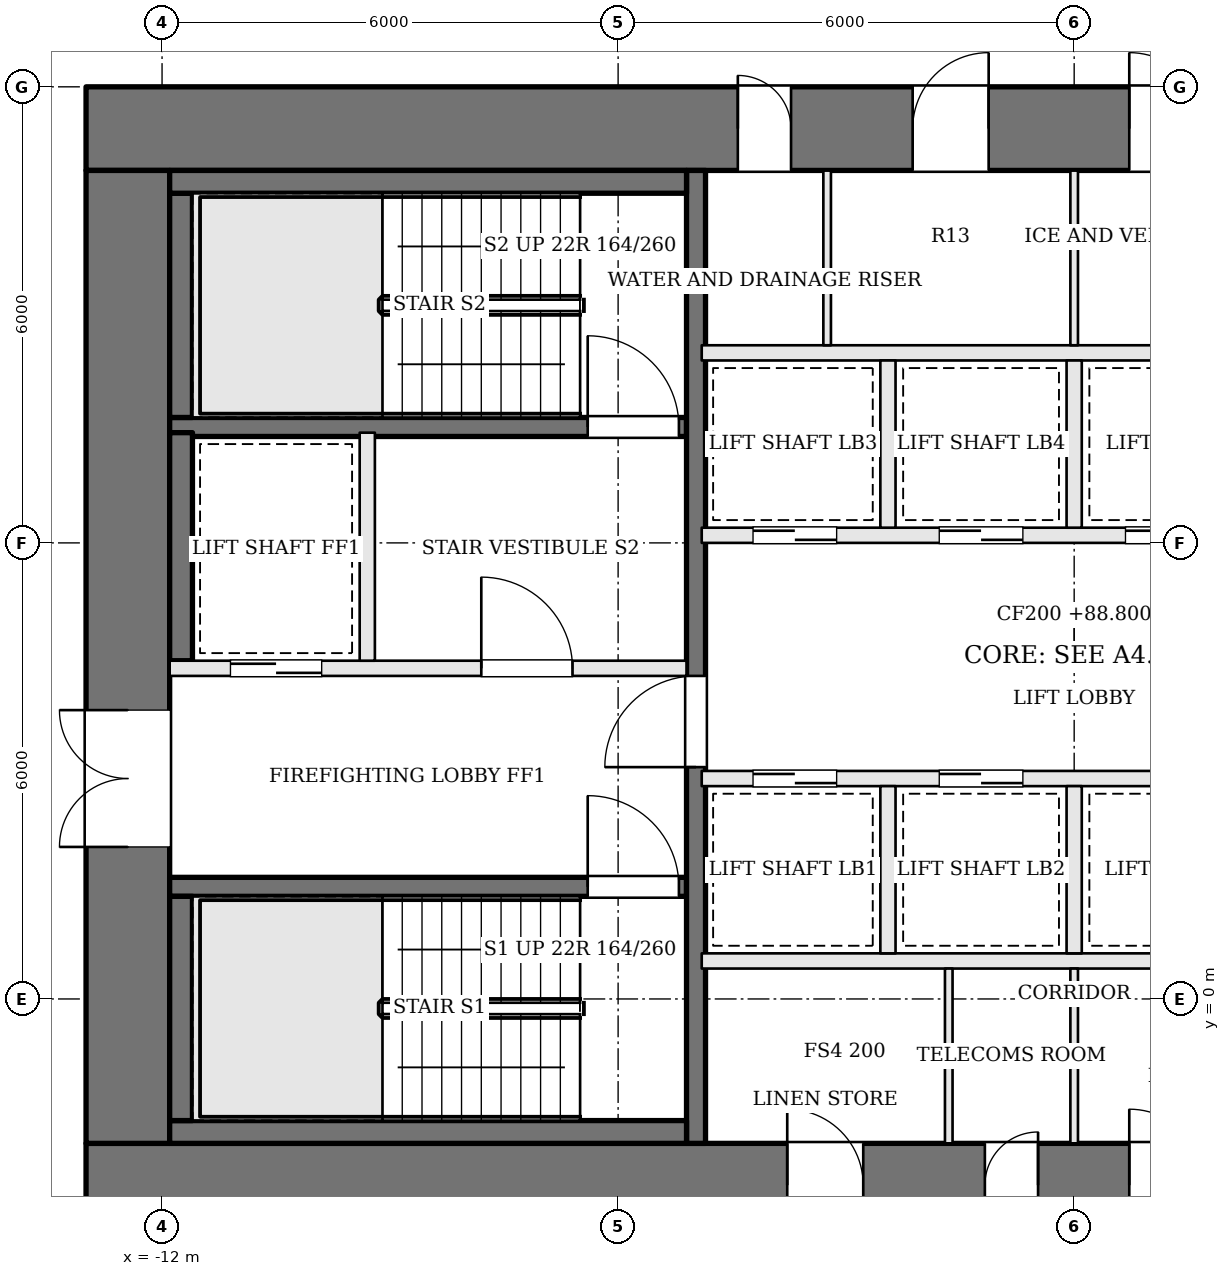
"""IFC4 building model, lengths in metres.
Left out: names, types, materials, properties, quantities, classifications, styles, units other than length and angle.
Written with IfcOpenShell. Run it as: python <this file> out.ifc"""

import sys

from ifc_helpers import new_model, si_unit, direction, frame, frame_2d, origin, place, context, subcontext, project, spatial, rectangle, extrude, element, fill, save


model = new_model("IFC4")
c1 = context("Model", 3, precision=1e-05, world=origin(), true_north=direction((0.0, 1.0)))
c2 = subcontext(c1, "Body", "Model", "MODEL_VIEW")
j1 = project(units=[si_unit("LENGTHUNIT", "METRE"), si_unit("PLANEANGLEUNIT", "RADIAN")], contexts=[c1])
p1 = place(None, origin())
s1 = spatial("IfcSite", under=j1, at=p1, CompositionType="ELEMENT")
p2 = place(p1, origin())
s2 = spatial("IfcBuilding", under=s1, at=p2, CompositionType="ELEMENT")
p3 = place(p2, frame((0.0, 0.0, 88.8)))
s3 = spatial("IfcBuildingStorey", under=s2, at=p3, CompositionType="ELEMENT", Elevation=88.8)
p4 = place(p3, frame((-13.0, 11.45, 0.0), z_axis=(0.0, 0.0, 1.0), x_axis=(1.0, 0.0, 0.0)))
e1 = element("IfcWall", 1, at=p4, inside=s3, PredefinedType="SHEAR", context=c2, shape_type="SweptSolid", body=[
    extrude(rectangle(XDim=26.0, YDim=1.1, at=frame_2d((13.0, 0.0))), origin(), (0.0, 0.0, 1.0), 3.6),
])
p5 = place(p4, frame((8.575, 0.0, 0.0)))
e2 = element("IfcOpeningElement", 2, at=p5, cuts=e1, PredefinedType="OPENING", context=c2, shape_type="SweptSolid", body=[
    extrude(rectangle(XDim=0.7, YDim=2.1, at=frame_2d((0.35, 1.05))), frame((0.0, 0.56, 0.0), z_axis=(0.0, -1.0, 0.0), x_axis=(1.0, 0.0, 0.0)), (0.0, 0.0, 1.0), 1.12),
])
p6 = place(p4, frame((10.875, 0.0, 0.0)))
e3 = element("IfcOpeningElement", 3, at=p6, cuts=e1, PredefinedType="OPENING", context=c2, shape_type="SweptSolid", body=[
    extrude(rectangle(XDim=1.0, YDim=2.1, at=frame_2d((0.5, 1.05))), frame((0.0, 0.56, 0.0), z_axis=(0.0, -1.0, 0.0), x_axis=(1.0, 0.0, 0.0)), (0.0, 0.0, 1.0), 1.12),
])
p7 = place(p4, frame((13.725, 0.0, 0.0)))
e4 = element("IfcOpeningElement", 4, at=p7, cuts=e1, PredefinedType="OPENING", context=c2, shape_type="SweptSolid", body=[
    extrude(rectangle(XDim=1.0, YDim=2.1, at=frame_2d((0.5, 1.05))), frame((0.0, 0.56, 0.0), z_axis=(0.0, -1.0, 0.0), x_axis=(1.0, 0.0, 0.0)), (0.0, 0.0, 1.0), 1.12),
])
p8 = place(p4, frame((16.175, 0.0, 0.0)))
e5 = element("IfcOpeningElement", 5, at=p8, cuts=e1, PredefinedType="OPENING", context=c2, shape_type="SweptSolid", body=[
    extrude(rectangle(XDim=1.0, YDim=2.1, at=frame_2d((0.5, 1.05))), frame((0.0, 0.56, 0.0), z_axis=(0.0, -1.0, 0.0), x_axis=(1.0, 0.0, 0.0)), (0.0, 0.0, 1.0), 1.12),
])
p9 = place(p3, frame((-13.0, -2.45, 0.0), z_axis=(0.0, 0.0, 1.0), x_axis=(1.0, 0.0, 0.0)))
e6 = element("IfcWall", 6, at=p9, inside=s3, PredefinedType="SHEAR", context=c2, shape_type="SweptSolid", body=[
    extrude(rectangle(XDim=26.0, YDim=1.1, at=frame_2d((13.0, 0.0))), origin(), (0.0, 0.0, 1.0), 3.6),
])
p10 = place(p9, frame((9.225, 0.0, 0.0)))
e7 = element("IfcOpeningElement", 7, at=p10, cuts=e6, PredefinedType="OPENING", context=c2, shape_type="SweptSolid", body=[
    extrude(rectangle(XDim=1.0, YDim=2.1, at=frame_2d((0.5, 1.05))), frame((0.0, 0.56, 0.0), z_axis=(0.0, -1.0, 0.0), x_axis=(1.0, 0.0, 0.0)), (0.0, 0.0, 1.0), 1.12),
])
p11 = place(p9, frame((11.825, 0.0, 0.0)))
e8 = element("IfcOpeningElement", 8, at=p11, cuts=e6, PredefinedType="OPENING", context=c2, shape_type="SweptSolid", body=[
    extrude(rectangle(XDim=0.7, YDim=2.1, at=frame_2d((0.35, 1.05))), frame((0.0, 0.56, 0.0), z_axis=(0.0, -1.0, 0.0), x_axis=(1.0, 0.0, 0.0)), (0.0, 0.0, 1.0), 1.12),
])
p12 = place(p9, frame((13.725, 0.0, 0.0)))
e9 = element("IfcOpeningElement", 9, at=p12, cuts=e6, PredefinedType="OPENING", context=c2, shape_type="SweptSolid", body=[
    extrude(rectangle(XDim=1.0, YDim=2.1, at=frame_2d((0.5, 1.05))), frame((0.0, 0.56, 0.0), z_axis=(0.0, -1.0, 0.0), x_axis=(1.0, 0.0, 0.0)), (0.0, 0.0, 1.0), 1.12),
])
p13 = place(p9, frame((16.225, 0.0, 0.0)))
e10 = element("IfcOpeningElement", 10, at=p13, cuts=e6, PredefinedType="OPENING", context=c2, shape_type="SweptSolid", body=[
    extrude(rectangle(XDim=0.9, YDim=2.1, at=frame_2d((0.45, 1.05))), frame((0.0, 0.56, 0.0), z_axis=(0.0, -1.0, 0.0), x_axis=(1.0, 0.0, 0.0)), (0.0, 0.0, 1.0), 1.12),
])
p14 = place(p3, frame((-12.45, -1.9, 0.0), z_axis=(0.0, 0.0, 1.0), x_axis=(0.0, 1.0, 0.0)))
e11 = element("IfcWall", 11, at=p14, inside=s3, PredefinedType="SHEAR", context=c2, shape_type="SweptSolid", body=[
    extrude(rectangle(XDim=12.8, YDim=1.1, at=frame_2d((6.4, 0.0))), origin(), (0.0, 0.0, 1.0), 3.6),
])
p15 = place(p14, frame((3.9, 0.0, 0.0)))
e12 = element("IfcOpeningElement", 12, at=p15, cuts=e11, PredefinedType="OPENING", context=c2, shape_type="SweptSolid", body=[
    extrude(rectangle(XDim=1.8, YDim=2.1, at=frame_2d((0.9, 1.05))), frame((0.0, 0.56, 0.0), z_axis=(0.0, -1.0, 0.0), x_axis=(1.0, 0.0, 0.0)), (0.0, 0.0, 1.0), 1.12),
])
p16 = place(p3, frame((-11.9, 1.475, 0.0), z_axis=(0.0, 0.0, 1.0), x_axis=(1.0, 0.0, 0.0)))
e13 = element("IfcWall", 13, at=p16, inside=s3, PredefinedType="SOLIDWALL", context=c2, shape_type="SweptSolid", body=[
    extrude(rectangle(XDim=6.8, YDim=0.25, at=frame_2d((3.4, 0.0))), origin(), (0.0, 0.0, 1.0), 3.4),
])
p17 = place(p16, frame((5.5, 0.0, 0.0)))
e14 = element("IfcOpeningElement", 14, at=p17, cuts=e13, PredefinedType="OPENING", context=c2, shape_type="SweptSolid", body=[
    extrude(rectangle(XDim=1.2, YDim=2.1, at=frame_2d((0.6, 1.05))), frame((0.0, 0.135, 0.0), z_axis=(0.0, -1.0, 0.0), x_axis=(1.0, 0.0, 0.0)), (0.0, 0.0, 1.0), 0.27),
])
p18 = place(p3, frame((-11.9, 4.35, 0.0), z_axis=(0.0, 0.0, 1.0), x_axis=(1.0, 0.0, 0.0)))
e15 = element("IfcWall", 15, at=p18, inside=s3, PredefinedType="SOLIDWALL", context=c2, shape_type="SweptSolid", body=[
    extrude(rectangle(XDim=6.8, YDim=0.2, at=frame_2d((3.4, 0.0))), origin(), (0.0, 0.0, 1.0), 3.4),
])
p19 = place(p18, frame((4.1, 0.0, 0.0)))
e16 = element("IfcOpeningElement", 16, at=p19, cuts=e15, PredefinedType="OPENING", context=c2, shape_type="SweptSolid", body=[
    extrude(rectangle(XDim=1.2, YDim=2.1, at=frame_2d((0.6, 1.05))), frame((0.0, 0.11, 0.0), z_axis=(0.0, -1.0, 0.0), x_axis=(1.0, 0.0, 0.0)), (0.0, 0.0, 1.0), 0.22),
])
p20 = place(p18, frame((0.8, 0.0, 0.0)))
e17 = element("IfcOpeningElement", 17, at=p20, cuts=e15, PredefinedType="OPENING", context=c2, shape_type="SweptSolid", body=[
    extrude(rectangle(XDim=1.2, YDim=2.1, at=frame_2d((0.6, 1.05))), frame((0.0, 0.11, 0.0), z_axis=(0.0, -1.0, 0.0), x_axis=(1.0, 0.0, 0.0)), (0.0, 0.0, 1.0), 0.22),
])
p21 = place(p3, frame((-11.9, 7.525, 0.0), z_axis=(0.0, 0.0, 1.0), x_axis=(1.0, 0.0, 0.0)))
e18 = element("IfcWall", 18, at=p21, inside=s3, PredefinedType="SOLIDWALL", context=c2, shape_type="SweptSolid", body=[
    extrude(rectangle(XDim=6.8, YDim=0.25, at=frame_2d((3.4, 0.0))), origin(), (0.0, 0.0, 1.0), 3.4),
])
p22 = place(p21, frame((5.5, 0.0, 0.0)))
e19 = element("IfcOpeningElement", 19, at=p22, cuts=e18, PredefinedType="OPENING", context=c2, shape_type="SweptSolid", body=[
    extrude(rectangle(XDim=1.2, YDim=2.1, at=frame_2d((0.6, 1.05))), frame((0.0, 0.135, 0.0), z_axis=(0.0, -1.0, 0.0), x_axis=(1.0, 0.0, 0.0)), (0.0, 0.0, 1.0), 0.27),
])
p23 = place(p3, frame((-9.3, 4.45, 0.0), z_axis=(0.0, 0.0, 1.0), x_axis=(0.0, 1.0, 0.0)))
e20 = element("IfcWall", 20, at=p23, inside=s3, PredefinedType="SOLIDWALL", context=c2, shape_type="SweptSolid", body=[
    extrude(rectangle(XDim=3.0, YDim=0.2, at=frame_2d((1.5, 0.0))), origin(), (0.0, 0.0, 1.0), 3.4),
])
p24 = place(p3, frame((-4.975, -1.9, 0.0), z_axis=(0.0, 0.0, 1.0), x_axis=(0.0, 1.0, 0.0)))
e21 = element("IfcWall", 21, at=p24, inside=s3, PredefinedType="SOLIDWALL", context=c2, shape_type="SweptSolid", body=[
    extrude(rectangle(XDim=12.8, YDim=0.25, at=frame_2d((6.4, 0.0))), origin(), (0.0, 0.0, 1.0), 3.4),
])
p25 = place(p24, frame((4.95, 0.0, 0.0)))
e22 = element("IfcOpeningElement", 22, at=p25, cuts=e21, PredefinedType="OPENING", context=c2, shape_type="SweptSolid", body=[
    extrude(rectangle(XDim=1.2, YDim=2.1, at=frame_2d((0.6, 1.05))), frame((0.0, 0.135, 0.0), z_axis=(0.0, -1.0, 0.0), x_axis=(1.0, 0.0, 0.0)), (0.0, 0.0, 1.0), 0.27),
])
p26 = place(p3, frame((-11.9, -1.75, 0.0), z_axis=(0.0, 0.0, 1.0), x_axis=(1.0, 0.0, 0.0)))
e23 = element("IfcWall", 23, at=p26, inside=s3, PredefinedType="SOLIDWALL", context=c2, shape_type="SweptSolid", body=[
    extrude(rectangle(XDim=6.8, YDim=0.3, at=frame_2d((3.4, 0.0))), origin(), (0.0, 0.0, 1.0), 3.4),
])
p27 = place(p3, frame((-11.75, -1.6, 0.0), z_axis=(0.0, 0.0, 1.0), x_axis=(0.0, 1.0, 0.0)))
e24 = element("IfcWall", 24, at=p27, inside=s3, PredefinedType="SOLIDWALL", context=c2, shape_type="SweptSolid", body=[
    extrude(rectangle(XDim=2.95, YDim=0.3, at=frame_2d((1.475, 0.0))), origin(), (0.0, 0.0, 1.0), 3.4),
])
p28 = place(p3, frame((-11.75, 4.45, 0.0), z_axis=(0.0, 0.0, 1.0), x_axis=(0.0, 1.0, 0.0)))
e25 = element("IfcWall", 25, at=p28, inside=s3, PredefinedType="SOLIDWALL", context=c2, shape_type="SweptSolid", body=[
    extrude(rectangle(XDim=3.0, YDim=0.3, at=frame_2d((1.5, 0.0))), origin(), (0.0, 0.0, 1.0), 3.4),
])
p29 = place(p3, frame((-11.75, 7.65, 0.0), z_axis=(0.0, 0.0, 1.0), x_axis=(0.0, 1.0, 0.0)))
e26 = element("IfcWall", 26, at=p29, inside=s3, PredefinedType="SOLIDWALL", context=c2, shape_type="SweptSolid", body=[
    extrude(rectangle(XDim=2.95, YDim=0.3, at=frame_2d((1.475, 0.0))), origin(), (0.0, 0.0, 1.0), 3.4),
])
p30 = place(p3, frame((-11.9, 10.75, 0.0), z_axis=(0.0, 0.0, 1.0), x_axis=(1.0, 0.0, 0.0)))
e27 = element("IfcWall", 27, at=p30, inside=s3, PredefinedType="SOLIDWALL", context=c2, shape_type="SweptSolid", body=[
    extrude(rectangle(XDim=6.8, YDim=0.3, at=frame_2d((3.4, 0.0))), origin(), (0.0, 0.0, 1.0), 3.4),
])
p31 = place(p3, frame((-4.9, 0.5, 0.0), z_axis=(0.0, 0.0, 1.0), x_axis=(1.0, 0.0, 0.0)))
e28 = element("IfcWall", 28, at=p31, inside=s3, PredefinedType="SOLIDWALL", context=c2, shape_type="SweptSolid", body=[
    extrude(rectangle(XDim=9.8, YDim=0.2, at=frame_2d((4.9, 0.0))), origin(), (0.0, 0.0, 1.0), 3.4),
])
p32 = place(p3, frame((-4.9, 2.9, 0.0), z_axis=(0.0, 0.0, 1.0), x_axis=(1.0, 0.0, 0.0)))
e29 = element("IfcWall", 29, at=p32, inside=s3, PredefinedType="SOLIDWALL", context=c2, shape_type="SweptSolid", body=[
    extrude(rectangle(XDim=9.8, YDim=0.2, at=frame_2d((4.9, 0.0))), origin(), (0.0, 0.0, 1.0), 3.4),
])
p33 = place(p32, frame((0.675, 0.0, 0.0)))
e30 = element("IfcOpeningElement", 30, at=p33, cuts=e29, PredefinedType="OPENING", context=c2, shape_type="SweptSolid", body=[
    extrude(rectangle(XDim=1.1, YDim=2.1, at=frame_2d((0.55, 1.05))), frame((0.0, 0.11, 0.0), z_axis=(0.0, -1.0, 0.0), x_axis=(1.0, 0.0, 0.0)), (0.0, 0.0, 1.0), 0.22),
])
p34 = place(p32, frame((3.125, 0.0, 0.0)))
e31 = element("IfcOpeningElement", 31, at=p34, cuts=e29, PredefinedType="OPENING", context=c2, shape_type="SweptSolid", body=[
    extrude(rectangle(XDim=1.1, YDim=2.1, at=frame_2d((0.55, 1.05))), frame((0.0, 0.11, 0.0), z_axis=(0.0, -1.0, 0.0), x_axis=(1.0, 0.0, 0.0)), (0.0, 0.0, 1.0), 0.22),
])
p35 = place(p3, frame((-4.9, 6.1, 0.0), z_axis=(0.0, 0.0, 1.0), x_axis=(1.0, 0.0, 0.0)))
e32 = element("IfcWall", 32, at=p35, inside=s3, PredefinedType="SOLIDWALL", context=c2, shape_type="SweptSolid", body=[
    extrude(rectangle(XDim=9.8, YDim=0.2, at=frame_2d((4.9, 0.0))), origin(), (0.0, 0.0, 1.0), 3.4),
])
p36 = place(p35, frame((0.675, 0.0, 0.0)))
e33 = element("IfcOpeningElement", 33, at=p36, cuts=e32, PredefinedType="OPENING", context=c2, shape_type="SweptSolid", body=[
    extrude(rectangle(XDim=1.1, YDim=2.1, at=frame_2d((0.55, 1.05))), frame((0.0, 0.11, 0.0), z_axis=(0.0, -1.0, 0.0), x_axis=(1.0, 0.0, 0.0)), (0.0, 0.0, 1.0), 0.22),
])
p37 = place(p35, frame((3.125, 0.0, 0.0)))
e34 = element("IfcOpeningElement", 34, at=p37, cuts=e32, PredefinedType="OPENING", context=c2, shape_type="SweptSolid", body=[
    extrude(rectangle(XDim=1.1, YDim=2.1, at=frame_2d((0.55, 1.05))), frame((0.0, 0.11, 0.0), z_axis=(0.0, -1.0, 0.0), x_axis=(1.0, 0.0, 0.0)), (0.0, 0.0, 1.0), 0.22),
])
p38 = place(p35, frame((5.575, 0.0, 0.0)))
e35 = element("IfcOpeningElement", 35, at=p38, cuts=e32, PredefinedType="OPENING", context=c2, shape_type="SweptSolid", body=[
    extrude(rectangle(XDim=1.1, YDim=2.1, at=frame_2d((0.55, 1.05))), frame((0.0, 0.11, 0.0), z_axis=(0.0, -1.0, 0.0), x_axis=(1.0, 0.0, 0.0)), (0.0, 0.0, 1.0), 0.22),
])
p39 = place(p35, frame((8.025, 0.0, 0.0)))
e36 = element("IfcOpeningElement", 36, at=p39, cuts=e32, PredefinedType="OPENING", context=c2, shape_type="SweptSolid", body=[
    extrude(rectangle(XDim=1.1, YDim=2.1, at=frame_2d((0.55, 1.05))), frame((0.0, 0.11, 0.0), z_axis=(0.0, -1.0, 0.0), x_axis=(1.0, 0.0, 0.0)), (0.0, 0.0, 1.0), 0.22),
])
p40 = place(p3, frame((-4.9, 8.5, 0.0), z_axis=(0.0, 0.0, 1.0), x_axis=(1.0, 0.0, 0.0)))
e37 = element("IfcWall", 37, at=p40, inside=s3, PredefinedType="SOLIDWALL", context=c2, shape_type="SweptSolid", body=[
    extrude(rectangle(XDim=9.8, YDim=0.2, at=frame_2d((4.9, 0.0))), origin(), (0.0, 0.0, 1.0), 3.4),
])
for number, where, z_axis, x_axis in (
    (38, (-2.45, 0.6, 0.0), (0.0, 0.0, 1.0), (0.0, 1.0, 0.0)),
    (39, (0.0, 0.6, 0.0), (0.0, 0.0, 1.0), (0.0, 1.0, 0.0)),
    (40, (-2.45, 6.2, 0.0), (0.0, 0.0, 1.0), (0.0, 1.0, 0.0)),
    (41, (0.0, 6.2, 0.0), (0.0, 0.0, 1.0), (0.0, 1.0, 0.0)),
):
    element("IfcWall", number, at=place(p3, frame(where, z_axis=z_axis, x_axis=x_axis)), inside=s3, PredefinedType="SOLIDWALL", context=c2, shape_type="SweptSolid", body=[
        extrude(rectangle(XDim=2.2, YDim=0.2, at=frame_2d((1.1, 0.0))), origin(), (0.0, 0.0, 1.0), 3.4),
    ])
for number, where, z_axis, x_axis in (
    (42, (-1.65, -1.9, 0.0), (0.0, 0.0, 1.0), (0.0, 1.0, 0.0)),
    (43, (0.0, -1.9, 0.0), (0.0, 0.0, 1.0), (0.0, 1.0, 0.0)),
    (44, (-3.25, 8.6, 0.0), (0.0, 0.0, 1.0), (0.0, 1.0, 0.0)),
    (45, (0.0, 8.6, 0.0), (0.0, 0.0, 1.0), (0.0, 1.0, 0.0)),
):
    element("IfcWall", number, at=place(p3, frame(where, z_axis=z_axis, x_axis=x_axis)), inside=s3, PredefinedType="PARTITIONING", context=c2, shape_type="SweptSolid", body=[
        extrude(rectangle(XDim=2.3, YDim=0.1, at=frame_2d((1.15, 0.0))), origin(), (0.0, 0.0, 1.0), 3.4),
    ])
p41 = place(p15, origin())
e46 = element("IfcDoor", 46, at=p41, inside=s3, OperationType="DOUBLE_DOOR_SINGLE_SWING", PredefinedType="DOOR", context=c2, shape_type="SweptSolid", body=[
    extrude(rectangle(XDim=1.8, YDim=2.1, at=frame_2d((0.9, 1.05))), frame((0.0, 0.025, 0.0), z_axis=(0.0, -1.0, 0.0), x_axis=(1.0, 0.0, 0.0)), (0.0, 0.0, 1.0), 0.05),
])
fill(e12, e46)
p42 = place(p25, origin())
e47 = element("IfcDoor", 47, at=p42, inside=s3, OperationType="SINGLE_SWING_LEFT", PredefinedType="DOOR", context=c2, shape_type="SweptSolid", body=[
    extrude(rectangle(XDim=1.2, YDim=2.1, at=frame_2d((0.6, 1.05))), frame((0.0, 0.025, 0.0), z_axis=(0.0, -1.0, 0.0), x_axis=(1.0, 0.0, 0.0)), (0.0, 0.0, 1.0), 0.05),
])
fill(e22, e47)
p43 = place(p19, origin())
e48 = element("IfcDoor", 48, at=p43, inside=s3, OperationType="SINGLE_SWING_LEFT", PredefinedType="DOOR", context=c2, shape_type="SweptSolid", body=[
    extrude(rectangle(XDim=1.2, YDim=2.1, at=frame_2d((0.6, 1.05))), frame((0.0, 0.025, 0.0), z_axis=(0.0, -1.0, 0.0), x_axis=(1.0, 0.0, 0.0)), (0.0, 0.0, 1.0), 0.05),
])
fill(e16, e48)
p44 = place(p17, origin())
e49 = element("IfcDoor", 49, at=p44, inside=s3, OperationType="SINGLE_SWING_LEFT", PredefinedType="DOOR", context=c2, shape_type="SweptSolid", body=[
    extrude(rectangle(XDim=1.2, YDim=2.1, at=frame_2d((0.6, 1.05))), frame((0.0, 0.025, 0.0), z_axis=(0.0, -1.0, 0.0), x_axis=(1.0, 0.0, 0.0)), (0.0, 0.0, 1.0), 0.05),
])
fill(e14, e49)
p45 = place(p22, origin())
e50 = element("IfcDoor", 50, at=p45, inside=s3, OperationType="SINGLE_SWING_LEFT", PredefinedType="DOOR", context=c2, shape_type="SweptSolid", body=[
    extrude(rectangle(XDim=1.2, YDim=2.1, at=frame_2d((0.6, 1.05))), frame((0.0, 0.025, 0.0), z_axis=(0.0, -1.0, 0.0), x_axis=(1.0, 0.0, 0.0)), (0.0, 0.0, 1.0), 0.05),
])
fill(e19, e50)
p46 = place(p20, origin())
e51 = element("IfcDoor", 51, at=p46, inside=s3, OperationType="SLIDING_TO_RIGHT", PredefinedType="DOOR", context=c2, shape_type="SweptSolid", body=[
    extrude(rectangle(XDim=1.2, YDim=2.1, at=frame_2d((0.6, 1.05))), frame((0.0, 0.025, 0.0), z_axis=(0.0, -1.0, 0.0), x_axis=(1.0, 0.0, 0.0)), (0.0, 0.0, 1.0), 0.05),
])
fill(e17, e51)
p47 = place(p33, origin())
e52 = element("IfcDoor", 52, at=p47, inside=s3, OperationType="SLIDING_TO_RIGHT", PredefinedType="DOOR", context=c2, shape_type="SweptSolid", body=[
    extrude(rectangle(XDim=1.1, YDim=2.1, at=frame_2d((0.55, 1.05))), frame((0.0, 0.025, 0.0), z_axis=(0.0, -1.0, 0.0), x_axis=(1.0, 0.0, 0.0)), (0.0, 0.0, 1.0), 0.05),
])
fill(e30, e52)
p48 = place(p34, origin())
e53 = element("IfcDoor", 53, at=p48, inside=s3, OperationType="SLIDING_TO_LEFT", PredefinedType="DOOR", context=c2, shape_type="SweptSolid", body=[
    extrude(rectangle(XDim=1.1, YDim=2.1, at=frame_2d((0.55, 1.05))), frame((0.0, 0.025, 0.0), z_axis=(0.0, -1.0, 0.0), x_axis=(1.0, 0.0, 0.0)), (0.0, 0.0, 1.0), 0.05),
])
fill(e31, e53)
p49 = place(p36, origin())
e54 = element("IfcDoor", 54, at=p49, inside=s3, OperationType="SLIDING_TO_RIGHT", PredefinedType="DOOR", context=c2, shape_type="SweptSolid", body=[
    extrude(rectangle(XDim=1.1, YDim=2.1, at=frame_2d((0.55, 1.05))), frame((0.0, 0.025, 0.0), z_axis=(0.0, -1.0, 0.0), x_axis=(1.0, 0.0, 0.0)), (0.0, 0.0, 1.0), 0.05),
])
fill(e33, e54)
p50 = place(p37, origin())
e55 = element("IfcDoor", 55, at=p50, inside=s3, OperationType="SLIDING_TO_LEFT", PredefinedType="DOOR", context=c2, shape_type="SweptSolid", body=[
    extrude(rectangle(XDim=1.1, YDim=2.1, at=frame_2d((0.55, 1.05))), frame((0.0, 0.025, 0.0), z_axis=(0.0, -1.0, 0.0), x_axis=(1.0, 0.0, 0.0)), (0.0, 0.0, 1.0), 0.05),
])
fill(e34, e55)
p51 = place(p38, origin())
e56 = element("IfcDoor", 56, at=p51, inside=s3, OperationType="SLIDING_TO_RIGHT", PredefinedType="DOOR", context=c2, shape_type="SweptSolid", body=[
    extrude(rectangle(XDim=1.1, YDim=2.1, at=frame_2d((0.55, 1.05))), frame((0.0, 0.025, 0.0), z_axis=(0.0, -1.0, 0.0), x_axis=(1.0, 0.0, 0.0)), (0.0, 0.0, 1.0), 0.05),
])
fill(e35, e56)
p52 = place(p10, origin())
e57 = element("IfcDoor", 57, at=p52, inside=s3, OperationType="SINGLE_SWING_LEFT", PredefinedType="DOOR", context=c2, shape_type="SweptSolid", body=[
    extrude(rectangle(XDim=1.0, YDim=2.1, at=frame_2d((0.5, 1.05))), frame((0.0, 0.025, 0.0), z_axis=(0.0, -1.0, 0.0), x_axis=(1.0, 0.0, 0.0)), (0.0, 0.0, 1.0), 0.05),
])
fill(e7, e57)
p53 = place(p11, origin())
e58 = element("IfcDoor", 58, at=p53, inside=s3, OperationType="SINGLE_SWING_RIGHT", PredefinedType="DOOR", context=c2, shape_type="SweptSolid", body=[
    extrude(rectangle(XDim=0.7, YDim=2.1, at=frame_2d((0.35, 1.05))), frame((0.0, 0.025, 0.0), z_axis=(0.0, -1.0, 0.0), x_axis=(1.0, 0.0, 0.0)), (0.0, 0.0, 1.0), 0.05),
])
fill(e8, e58)
p54 = place(p12, origin())
e59 = element("IfcDoor", 59, at=p54, inside=s3, OperationType="SINGLE_SWING_LEFT", PredefinedType="DOOR", context=c2, shape_type="SweptSolid", body=[
    extrude(rectangle(XDim=1.0, YDim=2.1, at=frame_2d((0.5, 1.05))), frame((0.0, 0.025, 0.0), z_axis=(0.0, -1.0, 0.0), x_axis=(1.0, 0.0, 0.0)), (0.0, 0.0, 1.0), 0.05),
])
fill(e9, e59)
p55 = place(p5, origin())
e60 = element("IfcDoor", 60, at=p55, inside=s3, OperationType="SINGLE_SWING_LEFT", PredefinedType="DOOR", context=c2, shape_type="SweptSolid", body=[
    extrude(rectangle(XDim=0.7, YDim=2.1, at=frame_2d((0.35, 1.05))), frame((0.0, 0.025, 0.0), z_axis=(0.0, -1.0, 0.0), x_axis=(1.0, 0.0, 0.0)), (0.0, 0.0, 1.0), 0.05),
])
fill(e2, e60)
p56 = place(p6, origin())
e61 = element("IfcDoor", 61, at=p56, inside=s3, OperationType="SINGLE_SWING_RIGHT", PredefinedType="DOOR", context=c2, shape_type="SweptSolid", body=[
    extrude(rectangle(XDim=1.0, YDim=2.1, at=frame_2d((0.5, 1.05))), frame((0.0, 0.025, 0.0), z_axis=(0.0, -1.0, 0.0), x_axis=(1.0, 0.0, 0.0)), (0.0, 0.0, 1.0), 0.05),
])
fill(e3, e61)
p57 = place(p7, origin())
e62 = element("IfcDoor", 62, at=p57, inside=s3, OperationType="SINGLE_SWING_LEFT", PredefinedType="DOOR", context=c2, shape_type="SweptSolid", body=[
    extrude(rectangle(XDim=1.0, YDim=2.1, at=frame_2d((0.5, 1.05))), frame((0.0, 0.025, 0.0), z_axis=(0.0, -1.0, 0.0), x_axis=(1.0, 0.0, 0.0)), (0.0, 0.0, 1.0), 0.05),
])
fill(e4, e62)
save(model, sys.argv[1])
